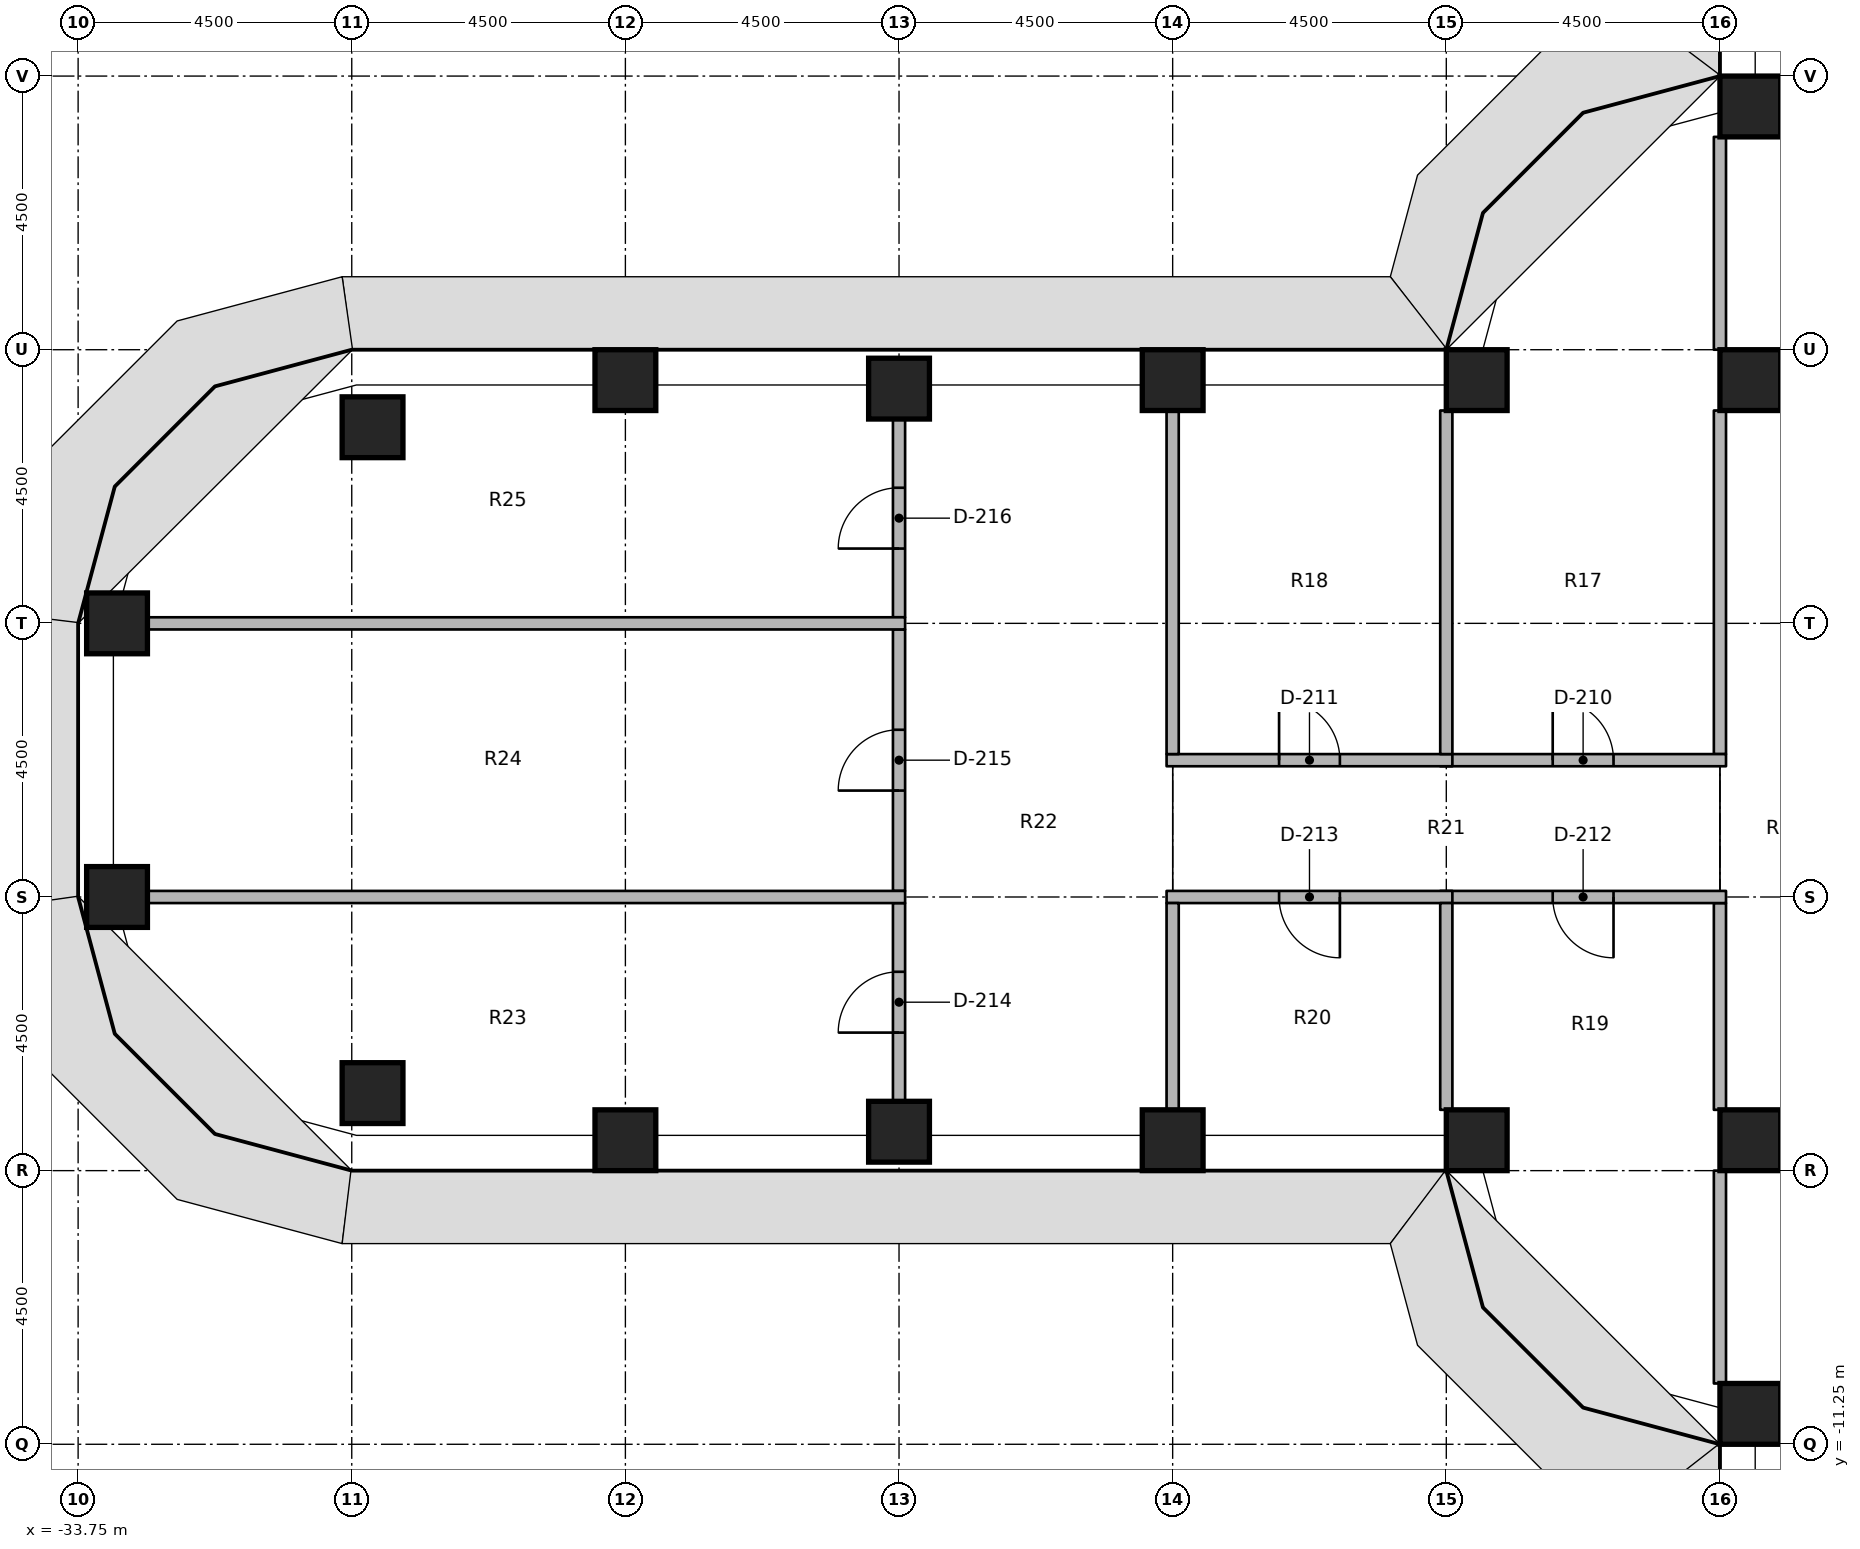
"""IFC4 building model, lengths in metres.
Left out: names, types, materials, properties, quantities, classifications, styles, units other than length and angle.
Written with IfcOpenShell. Run it as: python <this file> out.ifc"""

import sys

from ifc_helpers import new_model, si_unit, direction, frame, frame_2d, origin, origin_2d, place, context, subcontext, project, spatial, rectangle, extrude, element, fill, save


model = new_model("IFC4")
c1 = context("Model", 3, precision=1e-05, world=origin(), true_north=direction((0.0, 1.0)))
c2 = subcontext(c1, "Body", "Model", "MODEL_VIEW")
j1 = project(units=[si_unit("LENGTHUNIT", "METRE"), si_unit("PLANEANGLEUNIT", "RADIAN")], contexts=[c1])
p1 = place(None, origin())
s1 = spatial("IfcSite", under=j1, at=p1, CompositionType="ELEMENT")
p2 = place(p1, origin())
s2 = spatial("IfcBuilding", under=s1, at=p2, CompositionType="ELEMENT")
p3 = place(p2, frame((0.0, 0.0, 31.2)))
s3 = spatial("IfcBuildingStorey", under=s2, at=p3, CompositionType="ELEMENT", Elevation=31.2)
for number, where, z_axis, x_axis in (
    (1, (-33.11, -2.25, 0.0), (0.0, 0.0, 1.0), (1.0, 0.0, 0.0)),
    (2, (-33.11, 2.25, 0.0), (0.0, 0.0, 1.0), (1.0, 0.0, 0.0)),
    (3, (-28.908, -5.475, 0.0), (0.0, 0.0, 1.0), (1.0, 0.0, 0.0)),
    (4, (-28.908, 5.475, 0.0), (0.0, 0.0, 1.0), (1.0, 0.0, 0.0)),
    (5, (-24.75, -6.25, 0.0), (0.0, 0.0, 1.0), (1.0, 0.0, 0.0)),
    (6, (-24.75, 6.25, 0.0), (0.0, 0.0, 1.0), (1.0, 0.0, 0.0)),
    (7, (-20.25, -6.11, 0.0), (0.0, 0.0, 1.0), (1.0, 0.0, 0.0)),
    (8, (-20.25, 6.11, 0.0), (0.0, 0.0, 1.0), (1.0, 0.0, 0.0)),
    (9, (-15.75, -6.25, 0.0), (0.0, 0.0, 1.0), (1.0, 0.0, 0.0)),
    (10, (-15.75, 6.25, 0.0), (0.0, 0.0, 1.0), (1.0, 0.0, 0.0)),
    (11, (-10.75, -6.25, 0.0), (0.0, 0.0, 1.0), (1.0, 0.0, 0.0)),
    (12, (-10.75, 6.25, 0.0), (0.0, 0.0, 1.0), (1.0, 0.0, 0.0)),
    (13, (-6.25, -10.75, 0.0), (0.0, 0.0, 1.0), (1.0, 0.0, 0.0)),
    (14, (-6.25, -6.25, 0.0), (0.0, 0.0, 1.0), (1.0, 0.0, 0.0)),
    (15, (-6.25, 6.25, 0.0), (0.0, 0.0, 1.0), (1.0, 0.0, 0.0)),
    (16, (-6.25, 10.75, 0.0), (0.0, 0.0, 1.0), (1.0, 0.0, 0.0)),
):
    element("IfcColumn", number, at=place(p3, frame(where, z_axis=z_axis, x_axis=x_axis)), inside=s3, PredefinedType="COLUMN", context=c2, shape_type="SweptSolid", body=[
        extrude(rectangle(XDim=1.0, YDim=1.0, at=origin_2d()), origin(), (0.0, 0.0, 1.0), 4.05),
    ])
p4 = place(p3, frame((-6.75, 0.1, 0.0), z_axis=(0.0, 0.0, 1.0), x_axis=(0.0, 1.0, 0.0)))
e17 = element("IfcWall", 17, at=p4, inside=s3, PredefinedType="PARTITIONING", context=c2, shape_type="SweptSolid", body=[
    extrude(rectangle(XDim=5.65, YDim=0.2, at=frame_2d((2.825, 0.0))), origin(), (0.0, 0.0, 1.0), 3.131),
])
for number, where, z_axis, x_axis in (
    (18, (-6.75, 6.75, 0.0), (0.0, 0.0, 1.0), (0.0, 1.0, 0.0)),
    (19, (-6.75, -10.25, 0.0), (0.0, 0.0, 1.0), (0.0, 1.0, 0.0)),
):
    element("IfcWall", number, at=place(p3, frame(where, z_axis=z_axis, x_axis=x_axis)), inside=s3, PredefinedType="PARTITIONING", context=c2, shape_type="SweptSolid", body=[
        extrude(rectangle(XDim=3.5, YDim=0.2, at=frame_2d((1.75, 0.0))), origin(), (0.0, 0.0, 1.0), 3.131),
    ])
p5 = place(p3, frame((-6.75, -5.75, 0.0), z_axis=(0.0, 0.0, 1.0), x_axis=(0.0, 1.0, 0.0)))
e20 = element("IfcWall", 20, at=p5, inside=s3, PredefinedType="PARTITIONING", context=c2, shape_type="SweptSolid", body=[
    extrude(rectangle(XDim=3.4, YDim=0.2, at=frame_2d((1.7, 0.0))), origin(), (0.0, 0.0, 1.0), 3.131),
])
p6 = place(p3, frame((-11.35, 0.0, 0.0), z_axis=(0.0, 0.0, 1.0), x_axis=(1.0, 0.0, 0.0)))
e21 = element("IfcWall", 21, at=p6, inside=s3, PredefinedType="PARTITIONING", context=c2, shape_type="SweptSolid", body=[
    extrude(rectangle(XDim=4.7, YDim=0.2, at=frame_2d((2.35, 0.0))), origin(), (0.0, 0.0, 1.0), 3.131),
])
p7 = place(p6, frame((1.85, 0.0, 0.0)))
e22 = element("IfcOpeningElement", 22, at=p7, cuts=e21, PredefinedType="OPENING", context=c2, shape_type="SweptSolid", body=[
    extrude(rectangle(XDim=1.0, YDim=2.1, at=frame_2d((0.5, 1.05))), frame((0.0, 0.11, 0.0), z_axis=(0.0, -1.0, 0.0), x_axis=(1.0, 0.0, 0.0)), (0.0, 0.0, 1.0), 0.22),
])
p8 = place(p3, frame((-6.65, -2.25, 0.0), z_axis=(0.0, 0.0, 1.0), x_axis=(-1.0, 0.0, 0.0)))
e23 = element("IfcWall", 23, at=p8, inside=s3, PredefinedType="PARTITIONING", context=c2, shape_type="SweptSolid", body=[
    extrude(rectangle(XDim=4.7, YDim=0.2, at=frame_2d((2.35, 0.0))), origin(), (0.0, 0.0, 1.0), 3.131),
])
p9 = place(p8, frame((1.85, 0.0, 0.0)))
e24 = element("IfcOpeningElement", 24, at=p9, cuts=e23, PredefinedType="OPENING", context=c2, shape_type="SweptSolid", body=[
    extrude(rectangle(XDim=1.0, YDim=2.1, at=frame_2d((0.5, 1.05))), frame((0.0, 0.11, 0.0), z_axis=(0.0, -1.0, 0.0), x_axis=(1.0, 0.0, 0.0)), (0.0, 0.0, 1.0), 0.22),
])
p10 = place(p3, frame((-15.85, 0.0, 0.0), z_axis=(0.0, 0.0, 1.0), x_axis=(1.0, 0.0, 0.0)))
e25 = element("IfcWall", 25, at=p10, inside=s3, PredefinedType="PARTITIONING", context=c2, shape_type="SweptSolid", body=[
    extrude(rectangle(XDim=4.7, YDim=0.2, at=frame_2d((2.35, 0.0))), origin(), (0.0, 0.0, 1.0), 3.131),
])
p11 = place(p10, frame((1.85, 0.0, 0.0)))
e26 = element("IfcOpeningElement", 26, at=p11, cuts=e25, PredefinedType="OPENING", context=c2, shape_type="SweptSolid", body=[
    extrude(rectangle(XDim=1.0, YDim=2.1, at=frame_2d((0.5, 1.05))), frame((0.0, 0.11, 0.0), z_axis=(0.0, -1.0, 0.0), x_axis=(1.0, 0.0, 0.0)), (0.0, 0.0, 1.0), 0.22),
])
p12 = place(p3, frame((-11.15, -2.25, 0.0), z_axis=(0.0, 0.0, 1.0), x_axis=(-1.0, 0.0, 0.0)))
e27 = element("IfcWall", 27, at=p12, inside=s3, PredefinedType="PARTITIONING", context=c2, shape_type="SweptSolid", body=[
    extrude(rectangle(XDim=4.7, YDim=0.2, at=frame_2d((2.35, 0.0))), origin(), (0.0, 0.0, 1.0), 3.131),
])
p13 = place(p12, frame((1.85, 0.0, 0.0)))
e28 = element("IfcOpeningElement", 28, at=p13, cuts=e27, PredefinedType="OPENING", context=c2, shape_type="SweptSolid", body=[
    extrude(rectangle(XDim=1.0, YDim=2.1, at=frame_2d((0.5, 1.05))), frame((0.0, 0.11, 0.0), z_axis=(0.0, -1.0, 0.0), x_axis=(1.0, 0.0, 0.0)), (0.0, 0.0, 1.0), 0.22),
])
p14 = place(p3, frame((-11.25, 0.1, 0.0), z_axis=(0.0, 0.0, 1.0), x_axis=(0.0, 1.0, 0.0)))
e29 = element("IfcWall", 29, at=p14, inside=s3, PredefinedType="PARTITIONING", context=c2, shape_type="SweptSolid", body=[
    extrude(rectangle(XDim=5.65, YDim=0.2, at=frame_2d((2.825, 0.0))), origin(), (0.0, 0.0, 1.0), 3.131),
])
p15 = place(p3, frame((-11.25, -5.75, 0.0), z_axis=(0.0, 0.0, 1.0), x_axis=(0.0, 1.0, 0.0)))
e30 = element("IfcWall", 30, at=p15, inside=s3, PredefinedType="PARTITIONING", context=c2, shape_type="SweptSolid", body=[
    extrude(rectangle(XDim=3.4, YDim=0.2, at=frame_2d((1.7, 0.0))), origin(), (0.0, 0.0, 1.0), 3.131),
])
p16 = place(p3, frame((-15.75, 0.1, 0.0), z_axis=(0.0, 0.0, 1.0), x_axis=(0.0, 1.0, 0.0)))
e31 = element("IfcWall", 31, at=p16, inside=s3, PredefinedType="PARTITIONING", context=c2, shape_type="SweptSolid", body=[
    extrude(rectangle(XDim=5.65, YDim=0.2, at=frame_2d((2.825, 0.0))), origin(), (0.0, 0.0, 1.0), 3.131),
])
p17 = place(p3, frame((-15.75, -5.75, 0.0), z_axis=(0.0, 0.0, 1.0), x_axis=(0.0, 1.0, 0.0)))
e32 = element("IfcWall", 32, at=p17, inside=s3, PredefinedType="PARTITIONING", context=c2, shape_type="SweptSolid", body=[
    extrude(rectangle(XDim=3.4, YDim=0.2, at=frame_2d((1.7, 0.0))), origin(), (0.0, 0.0, 1.0), 3.131),
])
p18 = place(p3, frame((-20.25, -5.61, 0.0), z_axis=(0.0, 0.0, 1.0), x_axis=(0.0, 1.0, 0.0)))
e33 = element("IfcWall", 33, at=p18, inside=s3, PredefinedType="PARTITIONING", context=c2, shape_type="SweptSolid", body=[
    extrude(rectangle(XDim=3.26, YDim=0.2, at=frame_2d((1.63, 0.0))), origin(), (0.0, 0.0, 1.0), 3.131),
])
p19 = place(p18, frame((1.13, 0.0, 0.0)))
e34 = element("IfcOpeningElement", 34, at=p19, cuts=e33, PredefinedType="OPENING", context=c2, shape_type="SweptSolid", body=[
    extrude(rectangle(XDim=1.0, YDim=2.1, at=frame_2d((0.5, 1.05))), frame((0.0, 0.11, 0.0), z_axis=(0.0, -1.0, 0.0), x_axis=(1.0, 0.0, 0.0)), (0.0, 0.0, 1.0), 0.22),
])
p20 = place(p3, frame((-20.25, -2.15, 0.0), z_axis=(0.0, 0.0, 1.0), x_axis=(0.0, 1.0, 0.0)))
e35 = element("IfcWall", 35, at=p20, inside=s3, PredefinedType="PARTITIONING", context=c2, shape_type="SweptSolid", body=[
    extrude(rectangle(XDim=4.3, YDim=0.2, at=frame_2d((2.15, 0.0))), origin(), (0.0, 0.0, 1.0), 3.131),
])
p21 = place(p20, frame((1.65, 0.0, 0.0)))
e36 = element("IfcOpeningElement", 36, at=p21, cuts=e35, PredefinedType="OPENING", context=c2, shape_type="SweptSolid", body=[
    extrude(rectangle(XDim=1.0, YDim=2.1, at=frame_2d((0.5, 1.05))), frame((0.0, 0.11, 0.0), z_axis=(0.0, -1.0, 0.0), x_axis=(1.0, 0.0, 0.0)), (0.0, 0.0, 1.0), 0.22),
])
p22 = place(p3, frame((-20.25, 2.35, 0.0), z_axis=(0.0, 0.0, 1.0), x_axis=(0.0, 1.0, 0.0)))
e37 = element("IfcWall", 37, at=p22, inside=s3, PredefinedType="PARTITIONING", context=c2, shape_type="SweptSolid", body=[
    extrude(rectangle(XDim=3.26, YDim=0.2, at=frame_2d((1.63, 0.0))), origin(), (0.0, 0.0, 1.0), 3.131),
])
p23 = place(p22, frame((1.13, 0.0, 0.0)))
e38 = element("IfcOpeningElement", 38, at=p23, cuts=e37, PredefinedType="OPENING", context=c2, shape_type="SweptSolid", body=[
    extrude(rectangle(XDim=1.0, YDim=2.1, at=frame_2d((0.5, 1.05))), frame((0.0, 0.11, 0.0), z_axis=(0.0, -1.0, 0.0), x_axis=(1.0, 0.0, 0.0)), (0.0, 0.0, 1.0), 0.22),
])
for number, where, z_axis, x_axis in (
    (39, (-32.61, -2.25, 0.0), (0.0, 0.0, 1.0), (1.0, 0.0, 0.0)),
    (40, (-32.61, 2.25, 0.0), (0.0, 0.0, 1.0), (1.0, 0.0, 0.0)),
):
    element("IfcWall", number, at=place(p3, frame(where, z_axis=z_axis, x_axis=x_axis)), inside=s3, PredefinedType="PARTITIONING", context=c2, shape_type="SweptSolid", body=[
        extrude(rectangle(XDim=12.46, YDim=0.2, at=frame_2d((6.23, 0.0))), origin(), (0.0, 0.0, 1.0), 3.131),
    ])
p24 = place(p7, origin())
e41 = element("IfcDoor", 41, at=p24, inside=s3, OperationType="SINGLE_SWING_RIGHT", PredefinedType="DOOR", context=c2, shape_type="SweptSolid", body=[
    extrude(rectangle(XDim=1.0, YDim=2.1, at=frame_2d((0.5, 1.05))), frame((0.0, 0.025, 0.0), z_axis=(0.0, -1.0, 0.0), x_axis=(1.0, 0.0, 0.0)), (0.0, 0.0, 1.0), 0.05),
])
fill(e22, e41)
p25 = place(p11, origin())
e42 = element("IfcDoor", 42, at=p25, inside=s3, OperationType="SINGLE_SWING_RIGHT", PredefinedType="DOOR", context=c2, shape_type="SweptSolid", body=[
    extrude(rectangle(XDim=1.0, YDim=2.1, at=frame_2d((0.5, 1.05))), frame((0.0, 0.025, 0.0), z_axis=(0.0, -1.0, 0.0), x_axis=(1.0, 0.0, 0.0)), (0.0, 0.0, 1.0), 0.05),
])
fill(e26, e42)
p26 = place(p9, origin())
e43 = element("IfcDoor", 43, at=p26, inside=s3, OperationType="SINGLE_SWING_RIGHT", PredefinedType="DOOR", context=c2, shape_type="SweptSolid", body=[
    extrude(rectangle(XDim=1.0, YDim=2.1, at=frame_2d((0.5, 1.05))), frame((0.0, 0.025, 0.0), z_axis=(0.0, -1.0, 0.0), x_axis=(1.0, 0.0, 0.0)), (0.0, 0.0, 1.0), 0.05),
])
fill(e24, e43)
p27 = place(p13, origin())
e44 = element("IfcDoor", 44, at=p27, inside=s3, OperationType="SINGLE_SWING_RIGHT", PredefinedType="DOOR", context=c2, shape_type="SweptSolid", body=[
    extrude(rectangle(XDim=1.0, YDim=2.1, at=frame_2d((0.5, 1.05))), frame((0.0, 0.025, 0.0), z_axis=(0.0, -1.0, 0.0), x_axis=(1.0, 0.0, 0.0)), (0.0, 0.0, 1.0), 0.05),
])
fill(e28, e44)
p28 = place(p19, origin())
e45 = element("IfcDoor", 45, at=p28, inside=s3, OperationType="SINGLE_SWING_LEFT", PredefinedType="DOOR", context=c2, shape_type="SweptSolid", body=[
    extrude(rectangle(XDim=1.0, YDim=2.1, at=frame_2d((0.5, 1.05))), frame((0.0, 0.025, 0.0), z_axis=(0.0, -1.0, 0.0), x_axis=(1.0, 0.0, 0.0)), (0.0, 0.0, 1.0), 0.05),
])
fill(e34, e45)
p29 = place(p21, origin())
e46 = element("IfcDoor", 46, at=p29, inside=s3, OperationType="SINGLE_SWING_RIGHT", PredefinedType="DOOR", context=c2, shape_type="SweptSolid", body=[
    extrude(rectangle(XDim=1.0, YDim=2.1, at=frame_2d((0.5, 1.05))), frame((0.0, 0.025, 0.0), z_axis=(0.0, -1.0, 0.0), x_axis=(1.0, 0.0, 0.0)), (0.0, 0.0, 1.0), 0.05),
])
fill(e36, e46)
p30 = place(p23, origin())
e47 = element("IfcDoor", 47, at=p30, inside=s3, OperationType="SINGLE_SWING_RIGHT", PredefinedType="DOOR", context=c2, shape_type="SweptSolid", body=[
    extrude(rectangle(XDim=1.0, YDim=2.1, at=frame_2d((0.5, 1.05))), frame((0.0, 0.025, 0.0), z_axis=(0.0, -1.0, 0.0), x_axis=(1.0, 0.0, 0.0)), (0.0, 0.0, 1.0), 0.05),
])
fill(e38, e47)
save(model, sys.argv[1])
